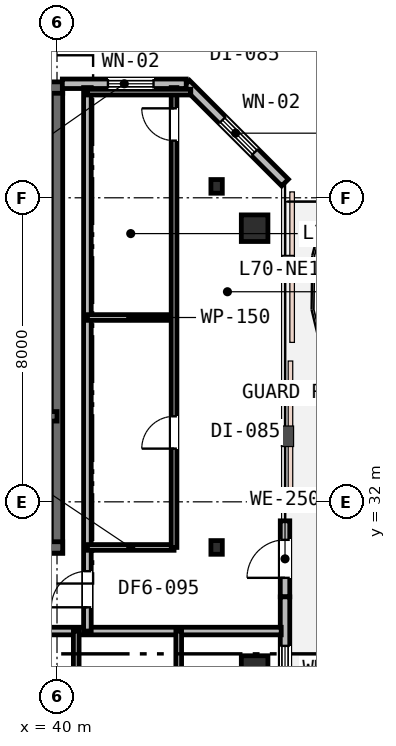
"""IFC4 building model, lengths in metres.
Left out: names, types, materials, properties, quantities, classifications, styles, units other than length and angle.
Written with IfcOpenShell. Run it as: python <this file> out.ifc"""

import sys

from ifc_helpers import new_model, si_unit, direction, frame, frame_2d, origin, origin_2d, place, context, subcontext, project, spatial, rectangle, i_section, extrude, element, fill, save


model = new_model("IFC4")
c1 = context("Model", 3, precision=1e-05, world=origin(), true_north=direction((0.0, 1.0)))
c2 = subcontext(c1, "Body", "Model", "MODEL_VIEW")
j1 = project(units=[si_unit("LENGTHUNIT", "METRE"), si_unit("PLANEANGLEUNIT", "RADIAN")], contexts=[c1])
p1 = place(None, origin())
s1 = spatial("IfcSite", under=j1, at=p1, CompositionType="ELEMENT")
p2 = place(p1, origin())
s2 = spatial("IfcBuilding", under=s1, at=p2, CompositionType="ELEMENT")
p3 = place(p2, frame((0.0, 0.0, 271.6)))
s3 = spatial("IfcBuildingStorey", under=s2, at=p3, CompositionType="ELEMENT", Elevation=271.6)
p4 = place(p3, frame((40.0, 30.65, 0.0), z_axis=(0.0, 0.0, 1.0), x_axis=(0.0, 1.0, 0.0)))
e1 = element("IfcWall", 1, at=p4, inside=s3, PredefinedType="SHEAR", context=c2, shape_type="SweptSolid", body=[
    extrude(rectangle(XDim=12.3, YDim=0.3, at=frame_2d((6.15, 0.0))), origin(), (0.0, 0.0, 1.0), 3.8),
])
p5 = place(p3, frame((15.85, 42.9, 0.0), z_axis=(0.0, 0.0, 1.0), x_axis=(1.0, 0.0, 0.0)))
e2 = element("IfcWall", 2, at=p5, inside=s3, PredefinedType="SHEAR", context=c2, shape_type="SweptSolid", body=[
    extrude(rectangle(XDim=24.3, YDim=0.3, at=frame_2d((12.15, 0.0))), origin(), (0.0, 0.0, 1.0), 3.8),
])
p6 = place(p3, frame((28.95, 30.8, 0.0), z_axis=(0.0, 0.0, 1.0), x_axis=(1.0, 0.0, 0.0)))
e3 = element("IfcWall", 3, at=p6, inside=s3, PredefinedType="SHEAR", context=c2, shape_type="SweptSolid", body=[
    extrude(rectangle(XDim=11.2, YDim=0.3, at=frame_2d((5.6, 0.0))), origin(), (0.0, 0.0, 1.0), 3.8),
])
p7 = place(p6, frame((7.65, 0.0, 0.0)))
e4 = element("IfcOpeningElement", 4, at=p7, cuts=e3, PredefinedType="OPENING", context=c2, shape_type="SweptSolid", body=[
    extrude(rectangle(XDim=1.1, YDim=2.15, at=frame_2d((0.55, 1.075))), frame((0.0, 0.16, 0.0), z_axis=(0.0, -1.0, 0.0), x_axis=(1.0, 0.0, 0.0)), (0.0, 0.0, 1.0), 0.32),
])
p8 = place(p3, frame((33.95, 34.25, 0.0), z_axis=(0.0, 0.0, 1.0), x_axis=(1.0, 0.0, 0.0)))
e5 = element("IfcWall", 5, at=p8, inside=s3, PredefinedType="SHEAR", context=c2, shape_type="SweptSolid", body=[
    extrude(rectangle(XDim=6.05, YDim=0.25, at=frame_2d((3.025, 0.0))), origin(), (0.0, 0.0, 1.0), 3.8),
])
p9 = place(p8, frame((3.7, 0.0, 0.0)))
e6 = element("IfcOpeningElement", 6, at=p9, cuts=e5, PredefinedType="OPENING", context=c2, shape_type="SweptSolid", body=[
    extrude(rectangle(XDim=1.0, YDim=2.15, at=frame_2d((0.5, 1.075))), frame((0.0, 0.135, 0.0), z_axis=(0.0, -1.0, 0.0), x_axis=(1.0, 0.0, 0.0)), (0.0, 0.0, 1.0), 0.27),
])
p10 = place(p8, frame((0.55, 0.0, 0.0)))
e7 = element("IfcOpeningElement", 7, at=p10, cuts=e5, PredefinedType="OPENING", context=c2, shape_type="SweptSolid", body=[
    extrude(rectangle(XDim=1.1, YDim=2.15, at=frame_2d((0.55, 1.075))), frame((0.0, 0.135, 0.0), z_axis=(0.0, -1.0, 0.0), x_axis=(1.0, 0.0, 0.0)), (0.0, 0.0, 1.0), 0.27),
])
for number, where, z_axis, x_axis in (
    (8, (45.2, 27.6, 0.0), (0.0, 0.0, 1.0), (1.0, 0.0, 0.0)),
    (9, (45.2, 39.2, 0.0), (0.0, 0.0, 1.0), (1.0, 0.0, 0.0)),
):
    element("IfcColumn", number, at=place(p3, frame(where, z_axis=z_axis, x_axis=x_axis)), inside=s3, PredefinedType="COLUMN", context=c2, shape_type="SweptSolid", body=[
        extrude(rectangle(XDim=0.7, YDim=0.7, at=origin_2d()), origin(), (0.0, 0.0, 1.0), 3.8),
    ])
for number, where, z_axis, x_axis in (
    (10, (44.2, 30.8, 0.0), (0.0, 0.0, 1.0), (1.0, 0.0, 0.0)),
    (11, (44.2, 40.3, 0.0), (0.0, 0.0, 1.0), (1.0, 0.0, 0.0)),
):
    element("IfcColumn", number, at=place(p3, frame(where, z_axis=z_axis, x_axis=x_axis)), inside=s3, PredefinedType="COLUMN", context=c2, shape_type="SweptSolid", body=[
        extrude(i_section(OverallWidth=0.3, OverallDepth=0.36, WebThickness=0.013, FlangeThickness=0.022, FilletRadius=0.027, at=origin_2d()), origin(), (0.0, 0.0, 1.0), 3.8),
    ])
p11 = place(p3, frame((46.0, 29.5, 0.0), z_axis=(0.0, 0.0, 1.0), x_axis=(0.0, 1.0, 0.0)))
e12 = element("IfcWall", 12, at=p11, inside=s3, PredefinedType="STANDARD", context=c2, shape_type="SweptSolid", body=[
    extrude(rectangle(XDim=2.0, YDim=0.25, at=frame_2d((1.0, 0.0))), origin(), (0.0, 0.0, 1.0), 3.53),
])
p12 = place(p11, frame((0.5, 0.0, 0.0)))
e13 = element("IfcOpeningElement", 13, at=p12, cuts=e12, PredefinedType="OPENING", context=c2, shape_type="SweptSolid", body=[
    extrude(rectangle(XDim=1.0, YDim=2.15, at=frame_2d((0.5, 1.075))), frame((0.0, 0.135, 0.0), z_axis=(0.0, -1.0, 0.0), x_axis=(1.0, 0.0, 0.0)), (0.0, 0.0, 1.0), 0.27),
])
p13 = place(p3, frame((46.0, 26.6, 0.0), z_axis=(0.0, 0.0, 1.0), x_axis=(0.0, 1.0, 0.0)))
e14 = element("IfcWall", 14, at=p13, inside=s3, PredefinedType="STANDARD", context=c2, shape_type="SweptSolid", body=[
    extrude(rectangle(XDim=2.9, YDim=0.25, at=frame_2d((1.45, 0.0))), origin(), (0.0, 0.0, 1.0), 3.53),
])
p14 = place(p13, frame((0.41, 0.0, 0.85)))
e15 = element("IfcOpeningElement", 15, at=p14, cuts=e14, PredefinedType="OPENING", context=c2, shape_type="SweptSolid", body=[
    extrude(rectangle(XDim=1.2, YDim=1.6, at=frame_2d((0.6, 0.8))), frame((0.0, 0.135, 0.0), z_axis=(0.0, -1.0, 0.0), x_axis=(1.0, 0.0, 0.0)), (0.0, 0.0, 1.0), 0.27),
])
p15 = place(p3, frame((46.0, 40.4, 0.0), z_axis=(0.0, 0.0, 1.0), x_axis=(-0.707106781187, 0.707106781187, 0.0)))
e16 = element("IfcWall", 16, at=p15, inside=s3, PredefinedType="STANDARD", context=c2, shape_type="SweptSolid", body=[
    extrude(rectangle(XDim=3.677, YDim=0.25, at=frame_2d((1.839, 0.0))), origin(), (0.0, 0.0, 1.0), 3.53),
])
p16 = place(p15, frame((1.128, 0.0, 0.85)))
e17 = element("IfcOpeningElement", 17, at=p16, cuts=e16, PredefinedType="OPENING", context=c2, shape_type="SweptSolid", body=[
    extrude(rectangle(XDim=1.2, YDim=1.6, at=frame_2d((0.6, 0.8))), frame((0.0, 0.135, 0.0), z_axis=(0.0, -1.0, 0.0), x_axis=(1.0, 0.0, 0.0)), (0.0, 0.0, 1.0), 0.27),
])
p17 = place(p3, frame((43.4, 43.0, 0.0), z_axis=(0.0, 0.0, 1.0), x_axis=(-1.0, 0.0, 0.0)))
e18 = element("IfcWall", 18, at=p17, inside=s3, PredefinedType="STANDARD", context=c2, shape_type="SweptSolid", body=[
    extrude(rectangle(XDim=3.26, YDim=0.25, at=frame_2d((1.63, 0.0))), origin(), (0.0, 0.0, 1.0), 3.53),
])
p18 = place(p17, frame((0.86, 0.0, 0.85)))
e19 = element("IfcOpeningElement", 19, at=p18, cuts=e18, PredefinedType="OPENING", context=c2, shape_type="SweptSolid", body=[
    extrude(rectangle(XDim=1.2, YDim=1.6, at=frame_2d((0.6, 0.8))), frame((0.0, 0.135, 0.0), z_axis=(0.0, -1.0, 0.0), x_axis=(1.0, 0.0, 0.0)), (0.0, 0.0, 1.0), 0.27),
])
p19 = place(p3, frame((20.0, 28.6, 0.0), z_axis=(0.0, 0.0, 1.0), x_axis=(1.0, 0.0, 0.0)))
e20 = element("IfcWall", 20, at=p19, inside=s3, PredefinedType="PARTITIONING", context=c2, shape_type="SweptSolid", body=[
    extrude(rectangle(XDim=25.9, YDim=0.2, at=frame_2d((12.95, 0.0))), origin(), (0.0, 0.0, 1.0), 3.16),
])
p20 = place(p19, frame((7.025, 0.0, 0.0)))
e21 = element("IfcOpeningElement", 21, at=p20, cuts=e20, PredefinedType="OPENING", context=c2, shape_type="SweptSolid", body=[
    extrude(rectangle(XDim=0.95, YDim=2.15, at=frame_2d((0.475, 1.075))), frame((0.0, 0.11, 0.0), z_axis=(0.0, -1.0, 0.0), x_axis=(1.0, 0.0, 0.0)), (0.0, 0.0, 1.0), 0.22),
])
p21 = place(p19, frame((13.625, 0.0, 0.0)))
e22 = element("IfcOpeningElement", 22, at=p21, cuts=e20, PredefinedType="OPENING", context=c2, shape_type="SweptSolid", body=[
    extrude(rectangle(XDim=0.95, YDim=2.15, at=frame_2d((0.475, 1.075))), frame((0.0, 0.11, 0.0), z_axis=(0.0, -1.0, 0.0), x_axis=(1.0, 0.0, 0.0)), (0.0, 0.0, 1.0), 0.22),
])
p22 = place(p19, frame((18.378, 0.0, 0.0)))
e23 = element("IfcOpeningElement", 23, at=p22, cuts=e20, PredefinedType="OPENING", context=c2, shape_type="SweptSolid", body=[
    extrude(rectangle(XDim=0.95, YDim=2.15, at=frame_2d((0.475, 1.075))), frame((0.0, 0.11, 0.0), z_axis=(0.0, -1.0, 0.0), x_axis=(1.0, 0.0, 0.0)), (0.0, 0.0, 1.0), 0.22),
])
p23 = place(p3, frame((40.8, 28.6, 0.0), z_axis=(0.0, 0.0, 1.0), x_axis=(0.0, 1.0, 0.0)))
e24 = element("IfcWall", 24, at=p23, inside=s3, PredefinedType="PARTITIONING", context=c2, shape_type="SweptSolid", body=[
    extrude(rectangle(XDim=14.3, YDim=0.2, at=frame_2d((7.15, 0.0))), origin(), (0.0, 0.0, 1.0), 3.16),
])
p24 = place(p23, frame((0.625, 0.0, 0.0)))
e25 = element("IfcOpeningElement", 25, at=p24, cuts=e24, PredefinedType="OPENING", context=c2, shape_type="SweptSolid", body=[
    extrude(rectangle(XDim=0.95, YDim=2.15, at=frame_2d((0.475, 1.075))), frame((0.0, 0.11, 0.0), z_axis=(0.0, -1.0, 0.0), x_axis=(1.0, 0.0, 0.0)), (0.0, 0.0, 1.0), 0.22),
])
p25 = place(p3, frame((40.8, 30.8, 0.0), z_axis=(0.0, 0.0, 1.0), x_axis=(1.0, 0.0, 0.0)))
e26 = element("IfcWall", 26, at=p25, inside=s3, PredefinedType="PARTITIONING", context=c2, shape_type="SweptSolid", body=[
    extrude(rectangle(XDim=2.28, YDim=0.15, at=frame_2d((1.14, 0.0))), origin(), (0.0, 0.0, 1.0), 3.16),
])
p26 = place(p3, frame((40.8, 36.85, 0.0), z_axis=(0.0, 0.0, 1.0), x_axis=(1.0, 0.0, 0.0)))
e27 = element("IfcWall", 27, at=p26, inside=s3, PredefinedType="PARTITIONING", context=c2, shape_type="SweptSolid", body=[
    extrude(rectangle(XDim=2.28, YDim=0.15, at=frame_2d((1.14, 0.0))), origin(), (0.0, 0.0, 1.0), 3.53),
])
p27 = place(p3, frame((43.08, 30.8, 0.0), z_axis=(0.0, 0.0, 1.0), x_axis=(0.0, 1.0, 0.0)))
e28 = element("IfcWall", 28, at=p27, inside=s3, PredefinedType="PARTITIONING", context=c2, shape_type="SweptSolid", body=[
    extrude(rectangle(XDim=12.1, YDim=0.15, at=frame_2d((6.05, 0.0))), origin(), (0.0, 0.0, 1.0), 3.16),
])
p28 = place(p27, frame((2.6, 0.0, 0.0)))
e29 = element("IfcOpeningElement", 29, at=p28, cuts=e28, PredefinedType="OPENING", context=c2, shape_type="SweptSolid", body=[
    extrude(rectangle(XDim=0.85, YDim=2.15, at=frame_2d((0.425, 1.075))), frame((0.0, 0.085, 0.0), z_axis=(0.0, -1.0, 0.0), x_axis=(1.0, 0.0, 0.0)), (0.0, 0.0, 1.0), 0.17),
])
p29 = place(p27, frame((10.704, 0.0, 0.0)))
e30 = element("IfcOpeningElement", 30, at=p29, cuts=e28, PredefinedType="OPENING", context=c2, shape_type="SweptSolid", body=[
    extrude(rectangle(XDim=0.85, YDim=2.15, at=frame_2d((0.425, 1.075))), frame((0.0, 0.085, 0.0), z_axis=(0.0, -1.0, 0.0), x_axis=(1.0, 0.0, 0.0)), (0.0, 0.0, 1.0), 0.17),
])
p30 = place(p3, frame((40.8, 42.78, 0.0), z_axis=(0.0, 0.0, 1.0), x_axis=(1.0, 0.0, 0.0)))
e31 = element("IfcWall", 31, at=p30, inside=s3, PredefinedType="PARTITIONING", context=c2, shape_type="SweptSolid", body=[
    extrude(rectangle(XDim=2.72, YDim=0.15, at=frame_2d((1.36, 0.0))), origin(), (0.0, 0.0, 1.0), 3.53),
])
for number, where, z_axis, x_axis in (
    (32, (40.506, 26.576, 0.0), (0.0, 0.0, 1.0), (0.0, 1.0, 0.0)),
    (33, (43.203, 26.576, 0.0), (0.0, 0.0, 1.0), (0.0, 1.0, 0.0)),
):
    element("IfcWall", number, at=place(p3, frame(where, z_axis=z_axis, x_axis=x_axis)), inside=s3, PredefinedType="PARTITIONING", context=c2, shape_type="SweptSolid", body=[
        extrude(rectangle(XDim=2.024, YDim=0.15, at=frame_2d((1.012, 0.0))), origin(), (0.0, 0.0, 1.0), 3.53),
    ])
p31 = place(p12, origin())
e34 = element("IfcDoor", 34, at=p31, inside=s3, OperationType="SINGLE_SWING_LEFT", PredefinedType="DOOR", context=c2, shape_type="SweptSolid", body=[
    extrude(rectangle(XDim=1.0, YDim=2.15, at=frame_2d((0.5, 1.075))), frame((0.0, 0.025, 0.0), z_axis=(0.0, -1.0, 0.0), x_axis=(1.0, 0.0, 0.0)), (0.0, 0.0, 1.0), 0.05),
])
fill(e13, e34)
p32 = place(p14, origin())
e35 = element("IfcWindow", 35, at=p32, inside=s3, PartitioningType="SINGLE_PANEL", PredefinedType="WINDOW", context=c2, shape_type="SweptSolid", body=[
    extrude(rectangle(XDim=1.2, YDim=1.6, at=frame_2d((0.6, 0.8))), frame((0.0, 0.03, 0.0), z_axis=(0.0, -1.0, 0.0), x_axis=(1.0, 0.0, 0.0)), (0.0, 0.0, 1.0), 0.06),
])
fill(e15, e35)
p33 = place(p16, origin())
e36 = element("IfcWindow", 36, at=p33, inside=s3, PartitioningType="SINGLE_PANEL", PredefinedType="WINDOW", context=c2, shape_type="SweptSolid", body=[
    extrude(rectangle(XDim=1.2, YDim=1.6, at=frame_2d((0.6, 0.8))), frame((0.0, 0.03, 0.0), z_axis=(0.0, -1.0, 0.0), x_axis=(1.0, 0.0, 0.0)), (0.0, 0.0, 1.0), 0.06),
])
fill(e17, e36)
p34 = place(p18, origin())
e37 = element("IfcWindow", 37, at=p34, inside=s3, PartitioningType="SINGLE_PANEL", PredefinedType="WINDOW", context=c2, shape_type="SweptSolid", body=[
    extrude(rectangle(XDim=1.2, YDim=1.6, at=frame_2d((0.6, 0.8))), frame((0.0, 0.03, 0.0), z_axis=(0.0, -1.0, 0.0), x_axis=(1.0, 0.0, 0.0)), (0.0, 0.0, 1.0), 0.06),
])
fill(e19, e37)
p35 = place(p24, origin())
e38 = element("IfcDoor", 38, at=p35, inside=s3, OperationType="SINGLE_SWING_LEFT", PredefinedType="DOOR", context=c2, shape_type="SweptSolid", body=[
    extrude(rectangle(XDim=0.95, YDim=2.15, at=frame_2d((0.475, 1.075))), frame((0.0, 0.025, 0.0), z_axis=(0.0, -1.0, 0.0), x_axis=(1.0, 0.0, 0.0)), (0.0, 0.0, 1.0), 0.05),
])
fill(e25, e38)
p36 = place(p28, origin())
e39 = element("IfcDoor", 39, at=p36, inside=s3, OperationType="SINGLE_SWING_LEFT", PredefinedType="DOOR", context=c2, shape_type="SweptSolid", body=[
    extrude(rectangle(XDim=0.85, YDim=2.15, at=frame_2d((0.425, 1.075))), frame((0.0, 0.025, 0.0), z_axis=(0.0, -1.0, 0.0), x_axis=(1.0, 0.0, 0.0)), (0.0, 0.0, 1.0), 0.05),
])
fill(e29, e39)
p37 = place(p29, origin())
e40 = element("IfcDoor", 40, at=p37, inside=s3, OperationType="SINGLE_SWING_RIGHT", PredefinedType="DOOR", context=c2, shape_type="SweptSolid", body=[
    extrude(rectangle(XDim=0.85, YDim=2.15, at=frame_2d((0.425, 1.075))), frame((0.0, 0.025, 0.0), z_axis=(0.0, -1.0, 0.0), x_axis=(1.0, 0.0, 0.0)), (0.0, 0.0, 1.0), 0.05),
])
fill(e30, e40)
save(model, sys.argv[1])
